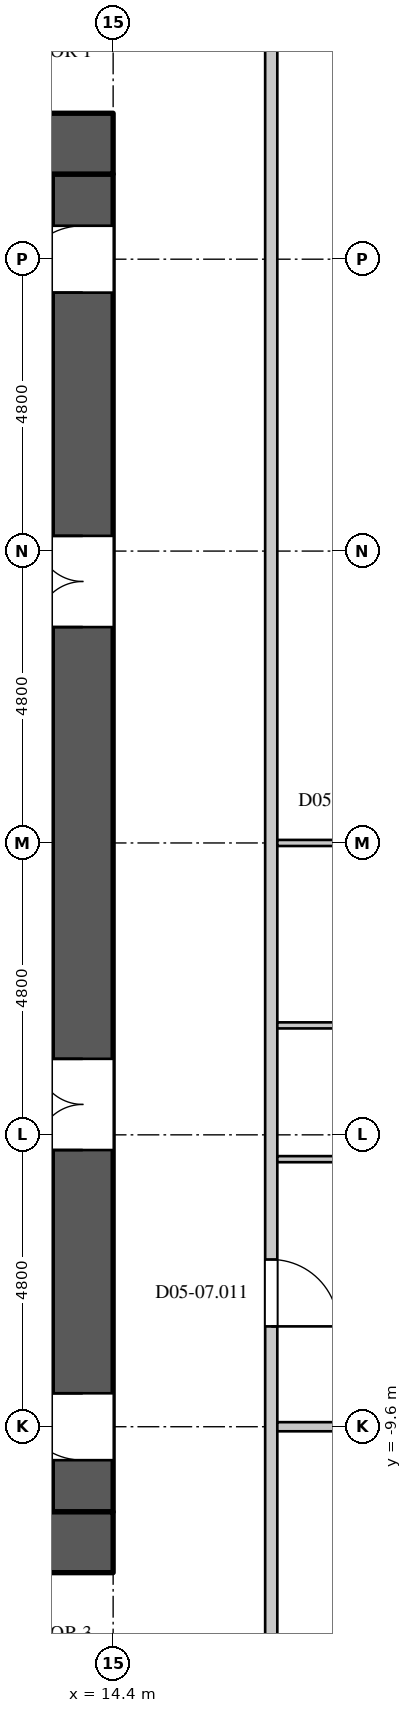
"""IFC4 building model, lengths in metres.
Left out: names, types, materials, properties, quantities, classifications, styles, units other than length and angle.
Written with IfcOpenShell. Run it as: python <this file> out.ifc"""

import sys

from ifc_helpers import new_model, si_unit, direction, frame, frame_2d, origin, place, context, subcontext, project, spatial, rectangle, extrude, element, fill, save


model = new_model("IFC4")
c1 = context("Model", 3, precision=1e-05, world=origin(), true_north=direction((0.0, 1.0)))
c2 = subcontext(c1, "Body", "Model", "MODEL_VIEW")
j1 = project(units=[si_unit("LENGTHUNIT", "METRE"), si_unit("PLANEANGLEUNIT", "RADIAN")], contexts=[c1])
p1 = place(None, origin())
s1 = spatial("IfcSite", under=j1, at=p1, CompositionType="ELEMENT")
p2 = place(p1, origin())
s2 = spatial("IfcBuilding", under=s1, at=p2, CompositionType="ELEMENT")
p3 = place(p2, frame((0.0, 0.0, 25.5)))
s3 = spatial("IfcBuildingStorey", under=s2, at=p3, CompositionType="ELEMENT", Elevation=25.5)
for number, where, z_axis, x_axis in (
    (1, (-14.4, 11.5, 0.0), (0.0, 0.0, 1.0), (1.0, 0.0, 0.0)),
    (2, (-14.4, -11.5, 0.0), (0.0, 0.0, 1.0), (1.0, 0.0, 0.0)),
):
    element("IfcWall", number, at=place(p3, frame(where, z_axis=z_axis, x_axis=x_axis)), inside=s3, PredefinedType="SHEAR", context=c2, shape_type="SweptSolid", body=[
        extrude(rectangle(XDim=28.8, YDim=1.0, at=frame_2d((14.4, 0.0))), origin(), (0.0, 0.0, 1.0), 4.2),
    ])
p4 = place(p3, frame((13.9, -11.0, 0.0), z_axis=(0.0, 0.0, 1.0), x_axis=(0.0, 1.0, 0.0)))
e3 = element("IfcWall", 3, at=p4, inside=s3, PredefinedType="SHEAR", context=c2, shape_type="SweptSolid", body=[
    extrude(rectangle(XDim=22.0, YDim=1.0, at=frame_2d((11.0, 0.0))), origin(), (0.0, 0.0, 1.0), 4.2),
])
p5 = place(p4, frame((20.05, 0.0, 0.0)))
e4 = element("IfcOpeningElement", 4, at=p5, cuts=e3, PredefinedType="OPENING", context=c2, shape_type="SweptSolid", body=[
    extrude(rectangle(XDim=1.1, YDim=2.2, at=frame_2d((0.55, 1.1))), frame((0.0, 0.51, 0.0), z_axis=(0.0, -1.0, 0.0), x_axis=(1.0, 0.0, 0.0)), (0.0, 0.0, 1.0), 1.02),
])
p6 = place(p4, frame((0.85, 0.0, 0.0)))
e5 = element("IfcOpeningElement", 5, at=p6, cuts=e3, PredefinedType="OPENING", context=c2, shape_type="SweptSolid", body=[
    extrude(rectangle(XDim=1.1, YDim=2.2, at=frame_2d((0.55, 1.1))), frame((0.0, 0.51, 0.0), z_axis=(0.0, -1.0, 0.0), x_axis=(1.0, 0.0, 0.0)), (0.0, 0.0, 1.0), 1.02),
])
p7 = place(p4, frame((14.55, 0.0, 0.0)))
e6 = element("IfcOpeningElement", 6, at=p7, cuts=e3, PredefinedType="OPENING", context=c2, shape_type="SweptSolid", body=[
    extrude(rectangle(XDim=1.5, YDim=2.4, at=frame_2d((0.75, 1.2))), frame((0.0, 0.51, 0.0), z_axis=(0.0, -1.0, 0.0), x_axis=(1.0, 0.0, 0.0)), (0.0, 0.0, 1.0), 1.02),
])
p8 = place(p4, frame((5.95, 0.0, 0.0)))
e7 = element("IfcOpeningElement", 7, at=p8, cuts=e3, PredefinedType="OPENING", context=c2, shape_type="SweptSolid", body=[
    extrude(rectangle(XDim=1.5, YDim=2.4, at=frame_2d((0.75, 1.2))), frame((0.0, 0.51, 0.0), z_axis=(0.0, -1.0, 0.0), x_axis=(1.0, 0.0, 0.0)), (0.0, 0.0, 1.0), 1.02),
])
p9 = place(p3, frame((17.0, -14.5, 0.0), z_axis=(0.0, 0.0, 1.0), x_axis=(0.0, 1.0, 0.0)))
e8 = element("IfcWall", 8, at=p9, inside=s3, PredefinedType="PARTITIONING", context=c2, shape_type="SweptSolid", body=[
    extrude(rectangle(XDim=29.0, YDim=0.2, at=frame_2d((14.5, 0.0))), origin(), (0.0, 0.0, 1.0), 3.95),
])
p10 = place(p9, frame((6.55, 0.0, 0.0)))
e9 = element("IfcOpeningElement", 9, at=p10, cuts=e8, PredefinedType="OPENING", context=c2, shape_type="SweptSolid", body=[
    extrude(rectangle(XDim=1.1, YDim=2.4, at=frame_2d((0.55, 1.2))), frame((0.0, 0.11, 0.0), z_axis=(0.0, -1.0, 0.0), x_axis=(1.0, 0.0, 0.0)), (0.0, 0.0, 1.0), 0.22),
])
p11 = place(p3, frame((17.1, -9.6, 0.0), z_axis=(0.0, 0.0, 1.0), x_axis=(1.0, 0.0, 0.0)))
e10 = element("IfcWall", 10, at=p11, inside=s3, PredefinedType="PARTITIONING", context=c2, shape_type="SweptSolid", body=[
    extrude(rectangle(XDim=11.755, YDim=0.15, at=frame_2d((5.877, 0.0))), origin(), (0.0, 0.0, 1.0), 3.95),
])
p12 = place(p11, frame((1.8, 0.0, 0.0)))
e11 = element("IfcOpeningElement", 11, at=p12, cuts=e10, PredefinedType="OPENING", context=c2, shape_type="SweptSolid", body=[
    extrude(rectangle(XDim=0.95, YDim=2.2, at=frame_2d((0.475, 1.1))), frame((0.0, 0.085, 0.0), z_axis=(0.0, -1.0, 0.0), x_axis=(1.0, 0.0, 0.0)), (0.0, 0.0, 1.0), 0.17),
])
p13 = place(p11, frame((8.05, 0.0, 0.0)))
e12 = element("IfcOpeningElement", 12, at=p13, cuts=e10, PredefinedType="OPENING", context=c2, shape_type="SweptSolid", body=[
    extrude(rectangle(XDim=1.5, YDim=2.2, at=frame_2d((0.75, 1.1))), frame((0.0, 0.085, 0.0), z_axis=(0.0, -1.0, 0.0), x_axis=(1.0, 0.0, 0.0)), (0.0, 0.0, 1.0), 0.17),
])
p14 = place(p3, frame((17.499, -17.499, 0.0), z_axis=(0.0, 0.0, 1.0), x_axis=(0.707106781187, 0.707106781187, 0.0)))
e13 = element("IfcWall", 13, at=p14, inside=s3, PredefinedType="PARTITIONING", context=c2, shape_type="SweptSolid", body=[
    extrude(rectangle(XDim=7.855, YDim=0.15, at=frame_2d((3.927, 0.0))), origin(), (0.0, 0.0, 1.0), 3.95),
])
p15 = place(p14, frame((2.0, 0.0, 0.0)))
e14 = element("IfcOpeningElement", 14, at=p15, cuts=e13, PredefinedType="OPENING", context=c2, shape_type="SweptSolid", body=[
    extrude(rectangle(XDim=0.95, YDim=2.2, at=frame_2d((0.475, 1.1))), frame((0.0, 0.085, 0.0), z_axis=(0.0, -1.0, 0.0), x_axis=(1.0, 0.0, 0.0)), (0.0, 0.0, 1.0), 0.17),
])
p16 = place(p3, frame((17.499, 17.499, 0.0), z_axis=(0.0, 0.0, 1.0), x_axis=(0.707106781187, -0.707106781187, 0.0)))
e15 = element("IfcWall", 15, at=p16, inside=s3, PredefinedType="PARTITIONING", context=c2, shape_type="SweptSolid", body=[
    extrude(rectangle(XDim=7.855, YDim=0.15, at=frame_2d((3.927, 0.0))), origin(), (0.0, 0.0, 1.0), 3.95),
])
p17 = place(p16, frame((2.1, 0.0, 0.0)))
e16 = element("IfcOpeningElement", 16, at=p17, cuts=e15, PredefinedType="OPENING", context=c2, shape_type="SweptSolid", body=[
    extrude(rectangle(XDim=0.95, YDim=2.2, at=frame_2d((0.475, 1.1))), frame((0.0, 0.085, 0.0), z_axis=(0.0, -1.0, 0.0), x_axis=(1.0, 0.0, 0.0)), (0.0, 0.0, 1.0), 0.17),
])
p18 = place(p16, frame((6.7, 0.0, 0.0)))
e17 = element("IfcOpeningElement", 17, at=p18, cuts=e15, PredefinedType="OPENING", context=c2, shape_type="SweptSolid", body=[
    extrude(rectangle(XDim=0.95, YDim=2.2, at=frame_2d((0.475, 1.1))), frame((0.0, 0.085, 0.0), z_axis=(0.0, -1.0, 0.0), x_axis=(1.0, 0.0, 0.0)), (0.0, 0.0, 1.0), 0.17),
])
p19 = place(p3, frame((17.1, -5.2, 0.0), z_axis=(0.0, 0.0, 1.0), x_axis=(1.0, 0.0, 0.0)))
e18 = element("IfcWall", 18, at=p19, inside=s3, PredefinedType="PARTITIONING", context=c2, shape_type="SweptSolid", body=[
    extrude(rectangle(XDim=4.625, YDim=0.1, at=frame_2d((2.312, 0.0))), origin(), (0.0, 0.0, 1.0), 3.95),
])
p20 = place(p19, frame((1.85, 0.0, 0.0)))
e19 = element("IfcOpeningElement", 19, at=p20, cuts=e18, PredefinedType="OPENING", context=c2, shape_type="SweptSolid", body=[
    extrude(rectangle(XDim=0.9, YDim=2.2, at=frame_2d((0.45, 1.1))), frame((0.0, 0.06, 0.0), z_axis=(0.0, -1.0, 0.0), x_axis=(1.0, 0.0, 0.0)), (0.0, 0.0, 1.0), 0.12),
])
p21 = place(p3, frame((17.1, -3.0, 0.0), z_axis=(0.0, 0.0, 1.0), x_axis=(1.0, 0.0, 0.0)))
e20 = element("IfcWall", 20, at=p21, inside=s3, PredefinedType="PARTITIONING", context=c2, shape_type="SweptSolid", body=[
    extrude(rectangle(XDim=4.65, YDim=0.1, at=frame_2d((2.325, 0.0))), origin(), (0.0, 0.0, 1.0), 3.95),
])
p22 = place(p3, frame((17.1, 0.0, 0.0), z_axis=(0.0, 0.0, 1.0), x_axis=(1.0, 0.0, 0.0)))
e21 = element("IfcWall", 21, at=p22, inside=s3, PredefinedType="PARTITIONING", context=c2, shape_type="SweptSolid", body=[
    extrude(rectangle(XDim=4.7, YDim=0.1, at=frame_2d((2.35, 0.0))), origin(), (0.0, 0.0, 1.0), 3.95),
])
p23 = place(p22, frame((1.85, 0.0, 0.0)))
e22 = element("IfcOpeningElement", 22, at=p23, cuts=e21, PredefinedType="OPENING", context=c2, shape_type="SweptSolid", body=[
    extrude(rectangle(XDim=0.9, YDim=2.2, at=frame_2d((0.45, 1.1))), frame((0.0, 0.06, 0.0), z_axis=(0.0, -1.0, 0.0), x_axis=(1.0, 0.0, 0.0)), (0.0, 0.0, 1.0), 0.12),
])
p24 = place(p5, origin())
e23 = element("IfcDoor", 23, at=p24, inside=s3, OperationType="SINGLE_SWING_LEFT", PredefinedType="DOOR", context=c2, shape_type="SweptSolid", body=[
    extrude(rectangle(XDim=1.1, YDim=2.2, at=frame_2d((0.55, 1.1))), frame((0.0, 0.495, 0.0), z_axis=(0.0, -1.0, 0.0), x_axis=(1.0, 0.0, 0.0)), (0.0, 0.0, 1.0), 0.05),
])
fill(e4, e23)
p25 = place(p6, origin())
e24 = element("IfcDoor", 24, at=p25, inside=s3, OperationType="SINGLE_SWING_RIGHT", PredefinedType="DOOR", context=c2, shape_type="SweptSolid", body=[
    extrude(rectangle(XDim=1.1, YDim=2.2, at=frame_2d((0.55, 1.1))), frame((0.0, 0.495, 0.0), z_axis=(0.0, -1.0, 0.0), x_axis=(1.0, 0.0, 0.0)), (0.0, 0.0, 1.0), 0.05),
])
fill(e5, e24)
p26 = place(p7, origin())
e25 = element("IfcDoor", 25, at=p26, inside=s3, OperationType="DOUBLE_DOOR_SINGLE_SWING", PredefinedType="DOOR", context=c2, shape_type="SweptSolid", body=[
    extrude(rectangle(XDim=1.5, YDim=2.4, at=frame_2d((0.75, 1.2))), frame((0.0, 0.495, 0.0), z_axis=(0.0, -1.0, 0.0), x_axis=(1.0, 0.0, 0.0)), (0.0, 0.0, 1.0), 0.05),
])
fill(e6, e25)
p27 = place(p8, origin())
e26 = element("IfcDoor", 26, at=p27, inside=s3, OperationType="DOUBLE_DOOR_SINGLE_SWING", PredefinedType="DOOR", context=c2, shape_type="SweptSolid", body=[
    extrude(rectangle(XDim=1.5, YDim=2.4, at=frame_2d((0.75, 1.2))), frame((0.0, 0.495, 0.0), z_axis=(0.0, -1.0, 0.0), x_axis=(1.0, 0.0, 0.0)), (0.0, 0.0, 1.0), 0.05),
])
fill(e7, e26)
p28 = place(p10, origin())
e27 = element("IfcDoor", 27, at=p28, inside=s3, OperationType="SINGLE_SWING_RIGHT", PredefinedType="DOOR", context=c2, shape_type="SweptSolid", body=[
    extrude(rectangle(XDim=1.1, YDim=2.4, at=frame_2d((0.55, 1.2))), frame((0.0, 0.025, 0.0), z_axis=(0.0, -1.0, 0.0), x_axis=(1.0, 0.0, 0.0)), (0.0, 0.0, 1.0), 0.05),
])
fill(e9, e27)
save(model, sys.argv[1])
